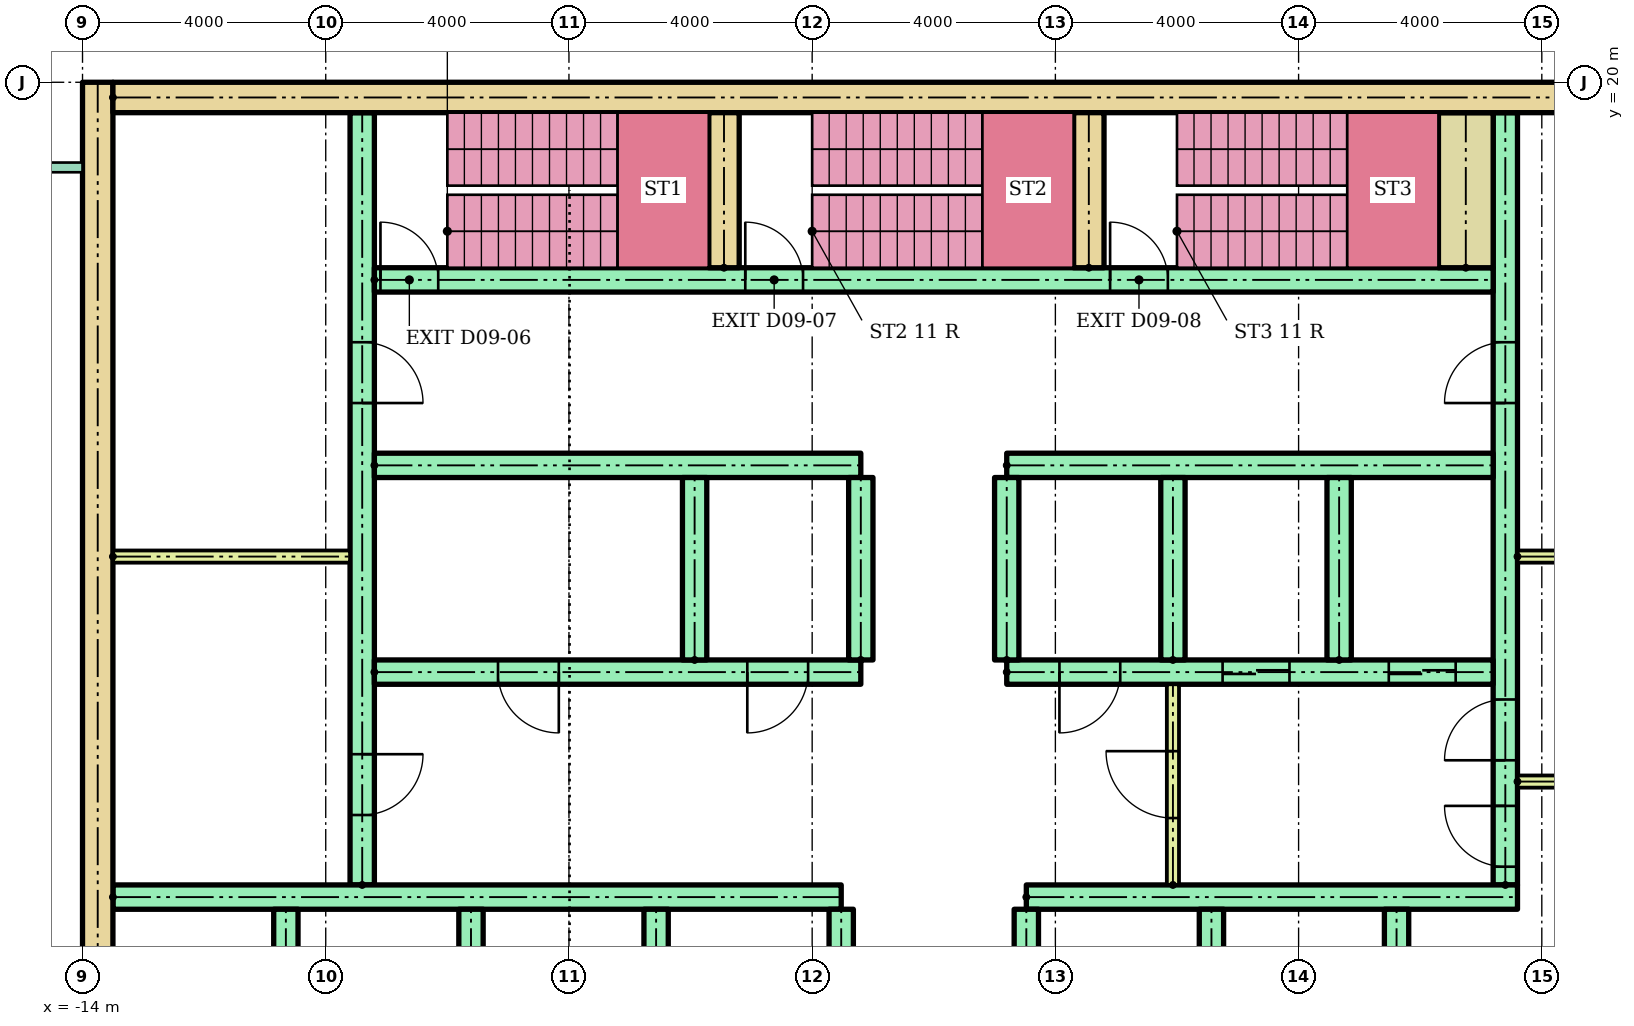
"""IFC4 building model, lengths in metres.
Left out: names, types, materials, properties, quantities, classifications, styles, units other than length and angle.
Written with IfcOpenShell. Run it as: python <this file> out.ifc"""

import sys

from ifc_helpers import new_model, si_unit, direction, frame, frame_2d, origin, place, context, subcontext, project, spatial, rectangle, extrude, element, fill, save


model = new_model("IFC4")
c1 = context("Model", 3, precision=1e-05, world=origin(), true_north=direction((0.0, 1.0)))
c2 = subcontext(c1, "Body", "Model", "MODEL_VIEW")
j1 = project(units=[si_unit("LENGTHUNIT", "METRE"), si_unit("PLANEANGLEUNIT", "RADIAN")], contexts=[c1])
p1 = place(None, origin())
s1 = spatial("IfcSite", under=j1, at=p1, CompositionType="ELEMENT")
p2 = place(p1, origin())
s2 = spatial("IfcBuilding", under=s1, at=p2, CompositionType="ELEMENT")
p3 = place(p2, frame((0.0, 0.0, 37.7)))
s3 = spatial("IfcBuildingStorey", under=s2, at=p3, CompositionType="ELEMENT", Elevation=37.7)
p4 = place(p3, frame((-13.75, 3.0, 0.0), z_axis=(0.0, 0.0, 1.0), x_axis=(0.0, 1.0, 0.0)))
e1 = element("IfcWall", 1, at=p4, inside=s3, PredefinedType="SHEAR", context=c2, shape_type="SweptSolid", body=[
    extrude(rectangle(XDim=17.0, YDim=0.5, at=frame_2d((8.5, 0.0))), origin(), (0.0, 0.0, 1.0), 3.62),
])
p5 = place(p3, frame((-13.5, 19.75, 0.0)))
e2 = element("IfcWall", 2, at=p5, inside=s3, PredefinedType="SHEAR", context=c2, shape_type="SweptSolid", body=[
    extrude(rectangle(XDim=27.0, YDim=0.5, at=frame_2d((13.5, 0.0))), origin(), (0.0, 0.0, 1.0), 3.62),
])
p6 = place(p3, frame((-9.4, 6.8, 0.0), z_axis=(0.0, 0.0, 1.0), x_axis=(0.0, 1.0, 0.0)))
e3 = element("IfcWall", 3, at=p6, inside=s3, PredefinedType="SHEAR", context=c2, shape_type="SweptSolid", body=[
    extrude(rectangle(XDim=12.7, YDim=0.4, at=frame_2d((6.35, 0.0))), origin(), (0.0, 0.0, 1.0), 3.62),
])
p7 = place(p6, frame((1.15, 0.0, 0.0)))
e4 = element("IfcOpeningElement", 4, at=p7, cuts=e3, PredefinedType="OPENING", context=c2, shape_type="SweptSolid", body=[
    extrude(rectangle(XDim=1.0, YDim=2.1, at=frame_2d((0.5, 1.05))), frame((0.0, 0.21, 0.0), z_axis=(0.0, -1.0, 0.0), x_axis=(1.0, 0.0, 0.0)), (0.0, 0.0, 1.0), 0.42),
])
p8 = place(p6, frame((7.925, 0.0, 0.0)))
e5 = element("IfcOpeningElement", 5, at=p8, cuts=e3, PredefinedType="OPENING", context=c2, shape_type="SweptSolid", body=[
    extrude(rectangle(XDim=1.0, YDim=2.1, at=frame_2d((0.5, 1.05))), frame((0.0, 0.21, 0.0), z_axis=(0.0, -1.0, 0.0), x_axis=(1.0, 0.0, 0.0)), (0.0, 0.0, 1.0), 0.42),
])
p9 = place(p3, frame((9.4, 6.8, 0.0), z_axis=(0.0, 0.0, 1.0), x_axis=(0.0, 1.0, 0.0)))
e6 = element("IfcWall", 6, at=p9, inside=s3, PredefinedType="SHEAR", context=c2, shape_type="SweptSolid", body=[
    extrude(rectangle(XDim=12.7, YDim=0.4, at=frame_2d((6.35, 0.0))), origin(), (0.0, 0.0, 1.0), 3.62),
])
p10 = place(p9, frame((0.3, 0.0, 0.0)))
e7 = element("IfcOpeningElement", 7, at=p10, cuts=e6, PredefinedType="OPENING", context=c2, shape_type="SweptSolid", body=[
    extrude(rectangle(XDim=1.0, YDim=2.1, at=frame_2d((0.5, 1.05))), frame((0.0, 0.21, 0.0), z_axis=(0.0, -1.0, 0.0), x_axis=(1.0, 0.0, 0.0)), (0.0, 0.0, 1.0), 0.42),
])
p11 = place(p9, frame((2.05, 0.0, 0.0)))
e8 = element("IfcOpeningElement", 8, at=p11, cuts=e6, PredefinedType="OPENING", context=c2, shape_type="SweptSolid", body=[
    extrude(rectangle(XDim=1.0, YDim=2.1, at=frame_2d((0.5, 1.05))), frame((0.0, 0.21, 0.0), z_axis=(0.0, -1.0, 0.0), x_axis=(1.0, 0.0, 0.0)), (0.0, 0.0, 1.0), 0.42),
])
p12 = place(p9, frame((7.925, 0.0, 0.0)))
e9 = element("IfcOpeningElement", 9, at=p12, cuts=e6, PredefinedType="OPENING", context=c2, shape_type="SweptSolid", body=[
    extrude(rectangle(XDim=1.0, YDim=2.1, at=frame_2d((0.5, 1.05))), frame((0.0, 0.21, 0.0), z_axis=(0.0, -1.0, 0.0), x_axis=(1.0, 0.0, 0.0)), (0.0, 0.0, 1.0), 0.42),
])
p13 = place(p3, frame((-13.5, 6.6, 0.0)))
e10 = element("IfcWall", 10, at=p13, inside=s3, PredefinedType="SHEAR", context=c2, shape_type="SweptSolid", body=[
    extrude(rectangle(XDim=11.978, YDim=0.4, at=frame_2d((5.989, 0.0))), origin(), (0.0, 0.0, 1.0), 3.62),
])
p14 = place(p3, frame((1.522, 6.6, 0.0)))
e11 = element("IfcWall", 11, at=p14, inside=s3, PredefinedType="SHEAR", context=c2, shape_type="SweptSolid", body=[
    extrude(rectangle(XDim=8.078, YDim=0.4, at=frame_2d((4.039, 0.0))), origin(), (0.0, 0.0, 1.0), 3.62),
])
for number, where, z_axis, x_axis in (
    (12, (-10.656, 3.4, 0.0), (0.0, 0.0, 1.0), (0.0, 1.0, 0.0)),
    (13, (-7.611, 3.4, 0.0), (0.0, 0.0, 1.0), (0.0, 1.0, 0.0)),
    (14, (-4.567, 3.4, 0.0), (0.0, 0.0, 1.0), (0.0, 1.0, 0.0)),
    (15, (-1.522, 3.4, 0.0), (0.0, 0.0, 1.0), (0.0, 1.0, 0.0)),
    (16, (1.522, 3.4, 0.0), (0.0, 0.0, 1.0), (0.0, 1.0, 0.0)),
    (17, (4.567, 3.4, 0.0), (0.0, 0.0, 1.0), (0.0, 1.0, 0.0)),
    (18, (7.611, 3.4, 0.0), (0.0, 0.0, 1.0), (0.0, 1.0, 0.0)),
):
    element("IfcWall", number, at=place(p3, frame(where, z_axis=z_axis, x_axis=x_axis)), inside=s3, PredefinedType="SHEAR", context=c2, shape_type="SweptSolid", body=[
        extrude(rectangle(XDim=3.0, YDim=0.4, at=frame_2d((1.5, 0.0))), origin(), (0.0, 0.0, 1.0), 3.62),
    ])
p15 = place(p3, frame((-9.2, 10.3, 0.0)))
e19 = element("IfcWall", 19, at=p15, inside=s3, PredefinedType="SHEAR", context=c2, shape_type="SweptSolid", body=[
    extrude(rectangle(XDim=8.0, YDim=0.4, at=frame_2d((4.0, 0.0))), origin(), (0.0, 0.0, 1.0), 3.62),
])
p16 = place(p15, frame((2.033, 0.0, 0.0)))
e20 = element("IfcOpeningElement", 20, at=p16, cuts=e19, PredefinedType="OPENING", context=c2, shape_type="SweptSolid", body=[
    extrude(rectangle(XDim=1.0, YDim=2.1, at=frame_2d((0.5, 1.05))), frame((0.0, 0.21, 0.0), z_axis=(0.0, -1.0, 0.0), x_axis=(1.0, 0.0, 0.0)), (0.0, 0.0, 1.0), 0.42),
])
p17 = place(p15, frame((6.133, 0.0, 0.0)))
e21 = element("IfcOpeningElement", 21, at=p17, cuts=e19, PredefinedType="OPENING", context=c2, shape_type="SweptSolid", body=[
    extrude(rectangle(XDim=1.0, YDim=2.1, at=frame_2d((0.5, 1.05))), frame((0.0, 0.21, 0.0), z_axis=(0.0, -1.0, 0.0), x_axis=(1.0, 0.0, 0.0)), (0.0, 0.0, 1.0), 0.42),
])
p18 = place(p3, frame((-9.2, 13.7, 0.0)))
e22 = element("IfcWall", 22, at=p18, inside=s3, PredefinedType="SHEAR", context=c2, shape_type="SweptSolid", body=[
    extrude(rectangle(XDim=8.0, YDim=0.4, at=frame_2d((4.0, 0.0))), origin(), (0.0, 0.0, 1.0), 3.62),
])
p19 = place(p3, frame((1.2, 10.3, 0.0)))
e23 = element("IfcWall", 23, at=p19, inside=s3, PredefinedType="SHEAR", context=c2, shape_type="SweptSolid", body=[
    extrude(rectangle(XDim=8.0, YDim=0.4, at=frame_2d((4.0, 0.0))), origin(), (0.0, 0.0, 1.0), 3.62),
])
p20 = place(p19, frame((3.55, 0.0, 0.0)))
e24 = element("IfcOpeningElement", 24, at=p20, cuts=e23, PredefinedType="OPENING", context=c2, shape_type="SweptSolid", body=[
    extrude(rectangle(XDim=1.1, YDim=2.1, at=frame_2d((0.55, 1.05))), frame((0.0, 0.21, 0.0), z_axis=(0.0, -1.0, 0.0), x_axis=(1.0, 0.0, 0.0)), (0.0, 0.0, 1.0), 0.42),
])
p21 = place(p19, frame((6.283, 0.0, 0.0)))
e25 = element("IfcOpeningElement", 25, at=p21, cuts=e23, PredefinedType="OPENING", context=c2, shape_type="SweptSolid", body=[
    extrude(rectangle(XDim=1.1, YDim=2.1, at=frame_2d((0.55, 1.05))), frame((0.0, 0.21, 0.0), z_axis=(0.0, -1.0, 0.0), x_axis=(1.0, 0.0, 0.0)), (0.0, 0.0, 1.0), 0.42),
])
p22 = place(p19, frame((0.867, 0.0, 0.0)))
e26 = element("IfcOpeningElement", 26, at=p22, cuts=e23, PredefinedType="OPENING", context=c2, shape_type="SweptSolid", body=[
    extrude(rectangle(XDim=1.0, YDim=2.1, at=frame_2d((0.5, 1.05))), frame((0.0, 0.21, 0.0), z_axis=(0.0, -1.0, 0.0), x_axis=(1.0, 0.0, 0.0)), (0.0, 0.0, 1.0), 0.42),
])
p23 = place(p3, frame((1.2, 13.7, 0.0)))
e27 = element("IfcWall", 27, at=p23, inside=s3, PredefinedType="SHEAR", context=c2, shape_type="SweptSolid", body=[
    extrude(rectangle(XDim=8.0, YDim=0.4, at=frame_2d((4.0, 0.0))), origin(), (0.0, 0.0, 1.0), 3.62),
])
for number, where, z_axis, x_axis in (
    (28, (-3.933, 10.5, 0.0), (0.0, 0.0, 1.0), (0.0, 1.0, 0.0)),
    (29, (-1.2, 10.5, 0.0), (0.0, 0.0, 1.0), (0.0, 1.0, 0.0)),
    (30, (1.2, 10.5, 0.0), (0.0, 0.0, 1.0), (0.0, 1.0, 0.0)),
    (31, (3.933, 10.5, 0.0), (0.0, 0.0, 1.0), (0.0, 1.0, 0.0)),
    (32, (6.667, 10.5, 0.0), (0.0, 0.0, 1.0), (0.0, 1.0, 0.0)),
):
    element("IfcWall", number, at=place(p3, frame(where, z_axis=z_axis, x_axis=x_axis)), inside=s3, PredefinedType="SHEAR", context=c2, shape_type="SweptSolid", body=[
        extrude(rectangle(XDim=3.0, YDim=0.4, at=frame_2d((1.5, 0.0))), origin(), (0.0, 0.0, 1.0), 3.62),
    ])
p24 = place(p3, frame((3.933, 6.8, 0.0), z_axis=(0.0, 0.0, 1.0), x_axis=(0.0, 1.0, 0.0)))
e33 = element("IfcWall", 33, at=p24, inside=s3, PredefinedType="PARTITIONING", context=c2, shape_type="SweptSolid", body=[
    extrude(rectangle(XDim=3.3, YDim=0.2, at=frame_2d((1.65, 0.0))), origin(), (0.0, 0.0, 1.0), 3.62),
])
p25 = place(p24, frame((1.1, 0.0, 0.0)))
e34 = element("IfcOpeningElement", 34, at=p25, cuts=e33, PredefinedType="OPENING", context=c2, shape_type="SweptSolid", body=[
    extrude(rectangle(XDim=1.1, YDim=2.1, at=frame_2d((0.55, 1.05))), frame((0.0, 0.11, 0.0), z_axis=(0.0, -1.0, 0.0), x_axis=(1.0, 0.0, 0.0)), (0.0, 0.0, 1.0), 0.22),
])
p26 = place(p3, frame((-9.2, 16.75, 0.0)))
e35 = element("IfcWall", 35, at=p26, inside=s3, PredefinedType="SHEAR", context=c2, shape_type="SweptSolid", body=[
    extrude(rectangle(XDim=18.4, YDim=0.4, at=frame_2d((9.2, 0.0))), origin(), (0.0, 0.0, 1.0), 3.62),
])
p27 = place(p26, frame((0.1, 0.0, 0.0)))
e36 = element("IfcOpeningElement", 36, at=p27, cuts=e35, PredefinedType="OPENING", context=c2, shape_type="SweptSolid", body=[
    extrude(rectangle(XDim=0.95, YDim=2.1, at=frame_2d((0.475, 1.05))), frame((0.0, 0.21, 0.0), z_axis=(0.0, -1.0, 0.0), x_axis=(1.0, 0.0, 0.0)), (0.0, 0.0, 1.0), 0.42),
])
p28 = place(p26, frame((6.1, 0.0, 0.0)))
e37 = element("IfcOpeningElement", 37, at=p28, cuts=e35, PredefinedType="OPENING", context=c2, shape_type="SweptSolid", body=[
    extrude(rectangle(XDim=0.95, YDim=2.1, at=frame_2d((0.475, 1.05))), frame((0.0, 0.21, 0.0), z_axis=(0.0, -1.0, 0.0), x_axis=(1.0, 0.0, 0.0)), (0.0, 0.0, 1.0), 0.42),
])
p29 = place(p26, frame((12.1, 0.0, 0.0)))
e38 = element("IfcOpeningElement", 38, at=p29, cuts=e35, PredefinedType="OPENING", context=c2, shape_type="SweptSolid", body=[
    extrude(rectangle(XDim=0.95, YDim=2.1, at=frame_2d((0.475, 1.05))), frame((0.0, 0.21, 0.0), z_axis=(0.0, -1.0, 0.0), x_axis=(1.0, 0.0, 0.0)), (0.0, 0.0, 1.0), 0.42),
])
for number, where, z_axis, x_axis in (
    (39, (-3.45, 16.95, 0.0), (0.0, 0.0, 1.0), (0.0, 1.0, 0.0)),
    (40, (2.55, 16.95, 0.0), (0.0, 0.0, 1.0), (0.0, 1.0, 0.0)),
):
    element("IfcWall", number, at=place(p3, frame(where, z_axis=z_axis, x_axis=x_axis)), inside=s3, PredefinedType="SHEAR", context=c2, shape_type="SweptSolid", body=[
        extrude(rectangle(XDim=2.55, YDim=0.5, at=frame_2d((1.275, 0.0))), origin(), (0.0, 0.0, 1.0), 3.62),
    ])
p30 = place(p3, frame((8.75, 16.95, 0.0), z_axis=(0.0, 0.0, 1.0), x_axis=(0.0, 1.0, 0.0)))
e41 = element("IfcWall", 41, at=p30, inside=s3, PredefinedType="SHEAR", context=c2, shape_type="SweptSolid", body=[
    extrude(rectangle(XDim=2.55, YDim=0.9, at=frame_2d((1.275, 0.0))), origin(), (0.0, 0.0, 1.0), 3.62),
])
for number, where in (
    (42, (-13.5, 12.2, 0.0)),
    (43, (9.6, 8.5, 0.0)),
    (44, (9.6, 12.2, 0.0)),
):
    element("IfcWall", number, at=place(p3, frame(where)), inside=s3, PredefinedType="PARTITIONING", context=c2, shape_type="SweptSolid", body=[
        extrude(rectangle(XDim=3.9, YDim=0.2, at=frame_2d((1.95, 0.0))), origin(), (0.0, 0.0, 1.0), 3.62),
    ])
p31 = place(p20, origin())
e45 = element("IfcDoor", 45, at=p31, inside=s3, OperationType="SLIDING_TO_LEFT", PredefinedType="DOOR", context=c2, shape_type="SweptSolid", body=[
    extrude(rectangle(XDim=1.1, YDim=2.1, at=frame_2d((0.55, 1.05))), frame((0.0, 0.025, 0.0), z_axis=(0.0, -1.0, 0.0), x_axis=(1.0, 0.0, 0.0)), (0.0, 0.0, 1.0), 0.05),
])
fill(e24, e45)
p32 = place(p21, origin())
e46 = element("IfcDoor", 46, at=p32, inside=s3, OperationType="SLIDING_TO_LEFT", PredefinedType="DOOR", context=c2, shape_type="SweptSolid", body=[
    extrude(rectangle(XDim=1.1, YDim=2.1, at=frame_2d((0.55, 1.05))), frame((0.0, 0.025, 0.0), z_axis=(0.0, -1.0, 0.0), x_axis=(1.0, 0.0, 0.0)), (0.0, 0.0, 1.0), 0.05),
])
fill(e25, e46)
p33 = place(p16, frame((1.0, 0.0, 0.0), z_axis=(0.0, 0.0, 1.0), x_axis=(-1.0, 0.0, 0.0)))
e47 = element("IfcDoor", 47, at=p33, inside=s3, OperationType="SINGLE_SWING_RIGHT", PredefinedType="DOOR", context=c2, shape_type="SweptSolid", body=[
    extrude(rectangle(XDim=1.0, YDim=2.1, at=frame_2d((0.5, 1.05))), frame((0.0, 0.025, 0.0), z_axis=(0.0, -1.0, 0.0), x_axis=(1.0, 0.0, 0.0)), (0.0, 0.0, 1.0), 0.05),
])
fill(e20, e47)
p34 = place(p17, frame((1.0, 0.0, 0.0), z_axis=(0.0, 0.0, 1.0), x_axis=(-1.0, 0.0, 0.0)))
e48 = element("IfcDoor", 48, at=p34, inside=s3, OperationType="SINGLE_SWING_LEFT", PredefinedType="DOOR", context=c2, shape_type="SweptSolid", body=[
    extrude(rectangle(XDim=1.0, YDim=2.1, at=frame_2d((0.5, 1.05))), frame((0.0, 0.025, 0.0), z_axis=(0.0, -1.0, 0.0), x_axis=(1.0, 0.0, 0.0)), (0.0, 0.0, 1.0), 0.05),
])
fill(e21, e48)
p35 = place(p22, frame((1.0, 0.0, 0.0), z_axis=(0.0, 0.0, 1.0), x_axis=(-1.0, 0.0, 0.0)))
e49 = element("IfcDoor", 49, at=p35, inside=s3, OperationType="SINGLE_SWING_LEFT", PredefinedType="DOOR", context=c2, shape_type="SweptSolid", body=[
    extrude(rectangle(XDim=1.0, YDim=2.1, at=frame_2d((0.5, 1.05))), frame((0.0, 0.025, 0.0), z_axis=(0.0, -1.0, 0.0), x_axis=(1.0, 0.0, 0.0)), (0.0, 0.0, 1.0), 0.05),
])
fill(e26, e49)
p36 = place(p25, origin())
e50 = element("IfcDoor", 50, at=p36, inside=s3, OperationType="SINGLE_SWING_RIGHT", PredefinedType="DOOR", context=c2, shape_type="SweptSolid", body=[
    extrude(rectangle(XDim=1.1, YDim=2.1, at=frame_2d((0.55, 1.05))), frame((0.0, 0.025, 0.0), z_axis=(0.0, -1.0, 0.0), x_axis=(1.0, 0.0, 0.0)), (0.0, 0.0, 1.0), 0.05),
])
fill(e34, e50)
p37 = place(p27, origin())
e51 = element("IfcDoor", 51, at=p37, inside=s3, OperationType="SINGLE_SWING_LEFT", PredefinedType="DOOR", context=c2, shape_type="SweptSolid", body=[
    extrude(rectangle(XDim=0.95, YDim=2.1, at=frame_2d((0.475, 1.05))), frame((0.0, 0.025, 0.0), z_axis=(0.0, -1.0, 0.0), x_axis=(1.0, 0.0, 0.0)), (0.0, 0.0, 1.0), 0.05),
])
fill(e36, e51)
p38 = place(p28, origin())
e52 = element("IfcDoor", 52, at=p38, inside=s3, OperationType="SINGLE_SWING_LEFT", PredefinedType="DOOR", context=c2, shape_type="SweptSolid", body=[
    extrude(rectangle(XDim=0.95, YDim=2.1, at=frame_2d((0.475, 1.05))), frame((0.0, 0.025, 0.0), z_axis=(0.0, -1.0, 0.0), x_axis=(1.0, 0.0, 0.0)), (0.0, 0.0, 1.0), 0.05),
])
fill(e37, e52)
p39 = place(p29, origin())
e53 = element("IfcDoor", 53, at=p39, inside=s3, OperationType="SINGLE_SWING_LEFT", PredefinedType="DOOR", context=c2, shape_type="SweptSolid", body=[
    extrude(rectangle(XDim=0.95, YDim=2.1, at=frame_2d((0.475, 1.05))), frame((0.0, 0.025, 0.0), z_axis=(0.0, -1.0, 0.0), x_axis=(1.0, 0.0, 0.0)), (0.0, 0.0, 1.0), 0.05),
])
fill(e38, e53)
p40 = place(p7, frame((1.0, 0.0, 0.0), z_axis=(0.0, 0.0, 1.0), x_axis=(-1.0, 0.0, 0.0)))
e54 = element("IfcDoor", 54, at=p40, inside=s3, OperationType="SINGLE_SWING_RIGHT", PredefinedType="DOOR", context=c2, shape_type="SweptSolid", body=[
    extrude(rectangle(XDim=1.0, YDim=2.1, at=frame_2d((0.5, 1.05))), frame((0.0, 0.025, 0.0), z_axis=(0.0, -1.0, 0.0), x_axis=(1.0, 0.0, 0.0)), (0.0, 0.0, 1.0), 0.05),
])
fill(e4, e54)
p41 = place(p8, frame((1.0, 0.0, 0.0), z_axis=(0.0, 0.0, 1.0), x_axis=(-1.0, 0.0, 0.0)))
e55 = element("IfcDoor", 55, at=p41, inside=s3, OperationType="SINGLE_SWING_LEFT", PredefinedType="DOOR", context=c2, shape_type="SweptSolid", body=[
    extrude(rectangle(XDim=1.0, YDim=2.1, at=frame_2d((0.5, 1.05))), frame((0.0, 0.025, 0.0), z_axis=(0.0, -1.0, 0.0), x_axis=(1.0, 0.0, 0.0)), (0.0, 0.0, 1.0), 0.05),
])
fill(e5, e55)
p42 = place(p10, origin())
e56 = element("IfcDoor", 56, at=p42, inside=s3, OperationType="SINGLE_SWING_RIGHT", PredefinedType="DOOR", context=c2, shape_type="SweptSolid", body=[
    extrude(rectangle(XDim=1.0, YDim=2.1, at=frame_2d((0.5, 1.05))), frame((0.0, 0.025, 0.0), z_axis=(0.0, -1.0, 0.0), x_axis=(1.0, 0.0, 0.0)), (0.0, 0.0, 1.0), 0.05),
])
fill(e7, e56)
p43 = place(p11, origin())
e57 = element("IfcDoor", 57, at=p43, inside=s3, OperationType="SINGLE_SWING_LEFT", PredefinedType="DOOR", context=c2, shape_type="SweptSolid", body=[
    extrude(rectangle(XDim=1.0, YDim=2.1, at=frame_2d((0.5, 1.05))), frame((0.0, 0.025, 0.0), z_axis=(0.0, -1.0, 0.0), x_axis=(1.0, 0.0, 0.0)), (0.0, 0.0, 1.0), 0.05),
])
fill(e8, e57)
p44 = place(p12, origin())
e58 = element("IfcDoor", 58, at=p44, inside=s3, OperationType="SINGLE_SWING_LEFT", PredefinedType="DOOR", context=c2, shape_type="SweptSolid", body=[
    extrude(rectangle(XDim=1.0, YDim=2.1, at=frame_2d((0.5, 1.05))), frame((0.0, 0.025, 0.0), z_axis=(0.0, -1.0, 0.0), x_axis=(1.0, 0.0, 0.0)), (0.0, 0.0, 1.0), 0.05),
])
fill(e9, e58)
save(model, sys.argv[1])
